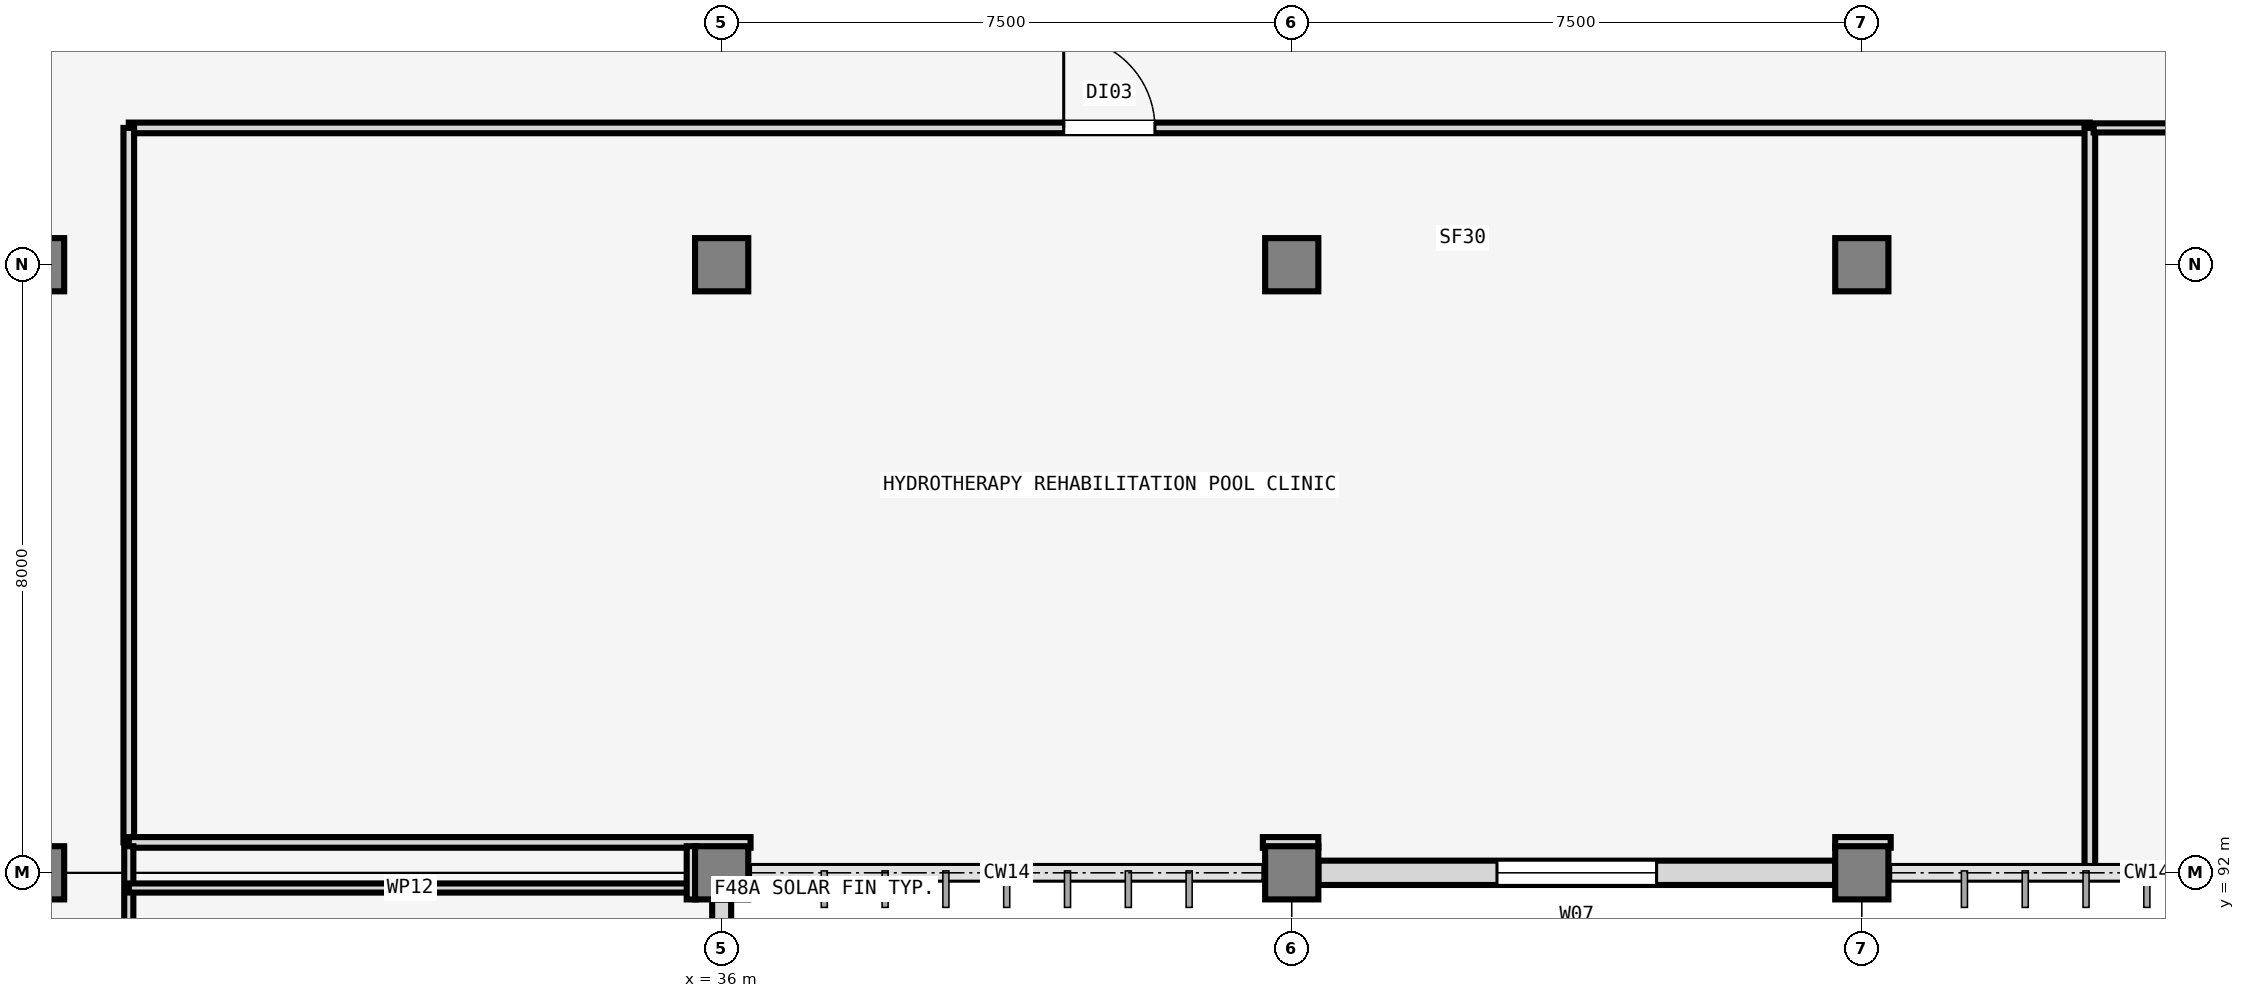
"""IFC4 building model, lengths in metres.
Left out: names, types, materials, properties, quantities, classifications, styles, units other than length and angle.
Written with IfcOpenShell. Run it as: python <this file> out.ifc"""

import sys

from ifc_helpers import new_model, si_unit, direction, frame, frame_2d, origin, origin_2d, place, context, subcontext, project, spatial, rectangle, extrude, element, fill, save


model = new_model("IFC4")
c1 = context("Model", 3, precision=1e-05, world=origin(), true_north=direction((0.0, 1.0)))
c2 = subcontext(c1, "Body", "Model", "MODEL_VIEW")
j1 = project(units=[si_unit("LENGTHUNIT", "METRE"), si_unit("PLANEANGLEUNIT", "RADIAN")], contexts=[c1])
p1 = place(None, origin())
s1 = spatial("IfcSite", under=j1, at=p1, CompositionType="ELEMENT")
p2 = place(p1, origin())
s2 = spatial("IfcBuilding", under=s1, at=p2, CompositionType="ELEMENT")
p3 = place(p2, origin())
s3 = spatial("IfcBuildingStorey", under=s2, at=p3, CompositionType="ELEMENT", Elevation=0.0)
for number, where, z_axis, x_axis in (
    (1, (27.0, 92.0, 0.0), (0.0, 0.0, 1.0), (1.0, 0.0, 0.0)),
    (2, (27.0, 100.0, 0.0), (0.0, 0.0, 1.0), (1.0, 0.0, 0.0)),
    (3, (36.0, 92.0, 0.0), (0.0, 0.0, 1.0), (1.0, 0.0, 0.0)),
    (4, (36.0, 100.0, 0.0), (0.0, 0.0, 1.0), (1.0, 0.0, 0.0)),
    (5, (43.5, 92.0, 0.0), (0.0, 0.0, 1.0), (1.0, 0.0, 0.0)),
    (6, (43.5, 100.0, 0.0), (0.0, 0.0, 1.0), (1.0, 0.0, 0.0)),
    (7, (51.0, 92.0, 0.0), (0.0, 0.0, 1.0), (1.0, 0.0, 0.0)),
    (8, (51.0, 100.0, 0.0), (0.0, 0.0, 1.0), (1.0, 0.0, 0.0)),
):
    element("IfcColumn", number, at=place(p3, frame(where, z_axis=z_axis, x_axis=x_axis)), inside=s3, PredefinedType="COLUMN", context=c2, shape_type="SweptSolid", body=[
        extrude(rectangle(XDim=0.7, YDim=0.7, at=origin_2d()), origin(), (0.0, 0.0, 1.0), 4.8),
    ])
p4 = place(p3, frame((43.85, 92.0, 0.0), z_axis=(0.0, 0.0, 1.0), x_axis=(1.0, 0.0, 0.0)))
e9 = element("IfcWall", 9, at=p4, inside=s3, PredefinedType="SOLIDWALL", context=c2, shape_type="SweptSolid", body=[
    extrude(rectangle(XDim=6.8, YDim=0.32, at=frame_2d((3.4, 0.0))), origin(), (0.0, 0.0, 1.0), 3.93),
])
p5 = place(p4, frame((2.35, 0.0, 0.95)))
e10 = element("IfcOpeningElement", 10, at=p5, cuts=e9, PredefinedType="OPENING", context=c2, shape_type="SweptSolid", body=[
    extrude(rectangle(XDim=2.1, YDim=1.55, at=frame_2d((1.05, 0.775))), frame((0.0, 0.17, 0.0), z_axis=(0.0, -1.0, 0.0), x_axis=(1.0, 0.0, 0.0)), (0.0, 0.0, 1.0), 0.34),
])
p6 = place(p3, frame((36.0, 84.35, 0.0), z_axis=(0.0, 0.0, 1.0), x_axis=(0.0, 1.0, 0.0)))
e11 = element("IfcWall", 11, at=p6, inside=s3, PredefinedType="SOLIDWALL", context=c2, shape_type="SweptSolid", body=[
    extrude(rectangle(XDim=7.3, YDim=0.25, at=frame_2d((3.65, 0.0))), origin(), (0.0, 0.0, 1.0), 3.73),
])
p7 = place(p6, frame((2.8, 0.0, 0.95)))
e12 = element("IfcOpeningElement", 12, at=p7, cuts=e11, PredefinedType="OPENING", context=c2, shape_type="SweptSolid", body=[
    extrude(rectangle(XDim=1.7, YDim=1.55, at=frame_2d((0.85, 0.775))), frame((0.0, 0.135, 0.0), z_axis=(0.0, -1.0, 0.0), x_axis=(1.0, 0.0, 0.0)), (0.0, 0.0, 1.0), 0.27),
])
p8 = place(p3, frame((28.2, 101.8, 0.0), z_axis=(0.0, 0.0, 1.0), x_axis=(1.0, 0.0, 0.0)))
e13 = element("IfcWall", 13, at=p8, inside=s3, PredefinedType="PARTITIONING", context=c2, shape_type="SweptSolid", body=[
    extrude(rectangle(XDim=25.8, YDim=0.14, at=frame_2d((12.9, 0.0))), origin(), (0.0, 0.0, 1.0), 3.68),
])
p9 = place(p8, frame((12.3, 0.0, 0.0)))
e14 = element("IfcOpeningElement", 14, at=p9, cuts=e13, PredefinedType="OPENING", context=c2, shape_type="SweptSolid", body=[
    extrude(rectangle(XDim=1.2, YDim=2.15, at=frame_2d((0.6, 1.075))), frame((0.0, 0.08, 0.0), z_axis=(0.0, -1.0, 0.0), x_axis=(1.0, 0.0, 0.0)), (0.0, 0.0, 1.0), 0.16),
])
p10 = place(p3, frame((28.2, 92.4, 0.0), z_axis=(0.0, 0.0, 1.0), x_axis=(0.0, 1.0, 0.0)))
e15 = element("IfcWall", 15, at=p10, inside=s3, PredefinedType="PARTITIONING", context=c2, shape_type="SweptSolid", body=[
    extrude(rectangle(XDim=9.4, YDim=0.14, at=frame_2d((4.7, 0.0))), origin(), (0.0, 0.0, 1.0), 3.68),
])
p11 = place(p3, frame((36.38, 92.4, 0.0), z_axis=(0.0, 0.0, 1.0), x_axis=(-1.0, 0.0, 0.0)))
e16 = element("IfcWall", 16, at=p11, inside=s3, PredefinedType="PARTITIONING", context=c2, shape_type="SweptSolid", body=[
    extrude(rectangle(XDim=8.18, YDim=0.14, at=frame_2d((4.09, 0.0))), origin(), (0.0, 0.0, 1.0), 3.68),
])
p12 = place(p3, frame((54.0, 101.8, 0.0), z_axis=(0.0, 0.0, 1.0), x_axis=(0.0, -1.0, 0.0)))
e17 = element("IfcWall", 17, at=p12, inside=s3, PredefinedType="PARTITIONING", context=c2, shape_type="SweptSolid", body=[
    extrude(rectangle(XDim=9.738, YDim=0.14, at=frame_2d((4.869, 0.0))), origin(), (0.0, 0.0, 1.0), 3.68),
])
for number, where, z_axis, x_axis in (
    (18, (51.38, 92.4, 0.0), (0.0, 0.0, 1.0), (-1.0, 0.0, 0.0)),
    (19, (43.85, 92.4, 0.0), (0.0, 0.0, 1.0), (-1.0, 0.0, 0.0)),
):
    element("IfcWall", number, at=place(p3, frame(where, z_axis=z_axis, x_axis=x_axis)), inside=s3, PredefinedType="PARTITIONING", context=c2, shape_type="SweptSolid", body=[
        extrude(rectangle(XDim=0.73, YDim=0.14, at=frame_2d((0.365, 0.0))), origin(), (0.0, 0.0, 1.0), 3.68),
    ])
p13 = place(p3, frame((54.05, 101.8, 0.0), z_axis=(0.0, 0.0, 1.0), x_axis=(1.0, 0.0, 0.0)))
e20 = element("IfcWall", 20, at=p13, inside=s3, PredefinedType="PARTITIONING", context=c2, shape_type="SweptSolid", body=[
    extrude(rectangle(XDim=14.75, YDim=0.12, at=frame_2d((7.375, 0.0))), origin(), (0.0, 0.0, 1.0), 3.68),
])
p14 = place(p13, frame((6.875, 0.0, 0.0)))
e21 = element("IfcOpeningElement", 21, at=p14, cuts=e20, PredefinedType="OPENING", context=c2, shape_type="SweptSolid", body=[
    extrude(rectangle(XDim=1.0, YDim=2.1, at=frame_2d((0.5, 1.05))), frame((0.0, 0.07, 0.0), z_axis=(0.0, -1.0, 0.0), x_axis=(1.0, 0.0, 0.0)), (0.0, 0.0, 1.0), 0.14),
])
p15 = place(p3, frame((28.2, 58.4, 0.0), z_axis=(0.0, 0.0, 1.0), x_axis=(0.0, 1.0, 0.0)))
e22 = element("IfcWall", 22, at=p15, inside=s3, PredefinedType="PARTITIONING", context=c2, shape_type="SweptSolid", body=[
    extrude(rectangle(XDim=33.95, YDim=0.12, at=frame_2d((16.975, 0.0))), origin(), (0.0, 0.0, 1.0), 3.68),
])
p16 = place(p15, frame((17.575, 0.0, 0.0)))
e23 = element("IfcOpeningElement", 23, at=p16, cuts=e22, PredefinedType="OPENING", context=c2, shape_type="SweptSolid", body=[
    extrude(rectangle(XDim=1.0, YDim=2.1, at=frame_2d((0.5, 1.05))), frame((0.0, 0.07, 0.0), z_axis=(0.0, -1.0, 0.0), x_axis=(1.0, 0.0, 0.0)), (0.0, 0.0, 1.0), 0.14),
])
p17 = place(p3, frame((28.2, 91.8, 0.0), z_axis=(0.0, 0.0, 1.0), x_axis=(1.0, 0.0, 0.0)))
e24 = element("IfcWall", 24, at=p17, inside=s3, PredefinedType="PARTITIONING", context=c2, shape_type="SweptSolid", body=[
    extrude(rectangle(XDim=7.4, YDim=0.12, at=frame_2d((3.7, 0.0))), origin(), (0.0, 0.0, 1.0), 3.68),
])
p18 = place(p3, frame((35.6, 92.35, 0.0), z_axis=(0.0, 0.0, 1.0), x_axis=(0.0, -1.0, 0.0)))
e25 = element("IfcWall", 25, at=p18, inside=s3, PredefinedType="PARTITIONING", context=c2, shape_type="SweptSolid", body=[
    extrude(rectangle(XDim=0.7, YDim=0.12, at=frame_2d((0.35, 0.0))), origin(), (0.0, 0.0, 1.0), 3.68),
])
p19 = place(p5, origin())
e26 = element("IfcWindow", 26, at=p19, inside=s3, PartitioningType="SINGLE_PANEL", PredefinedType="WINDOW", context=c2, shape_type="SweptSolid", body=[
    extrude(rectangle(XDim=2.1, YDim=1.55, at=frame_2d((1.05, 0.775))), frame((0.0, 0.03, 0.0), z_axis=(0.0, -1.0, 0.0), x_axis=(1.0, 0.0, 0.0)), (0.0, 0.0, 1.0), 0.06),
])
fill(e10, e26)
p20 = place(p9, origin())
e27 = element("IfcDoor", 27, at=p20, inside=s3, OperationType="SINGLE_SWING_LEFT", PredefinedType="DOOR", context=c2, shape_type="SweptSolid", body=[
    extrude(rectangle(XDim=1.2, YDim=2.15, at=frame_2d((0.6, 1.075))), frame((0.0, 0.025, 0.0), z_axis=(0.0, -1.0, 0.0), x_axis=(1.0, 0.0, 0.0)), (0.0, 0.0, 1.0), 0.05),
])
fill(e14, e27)
save(model, sys.argv[1])
